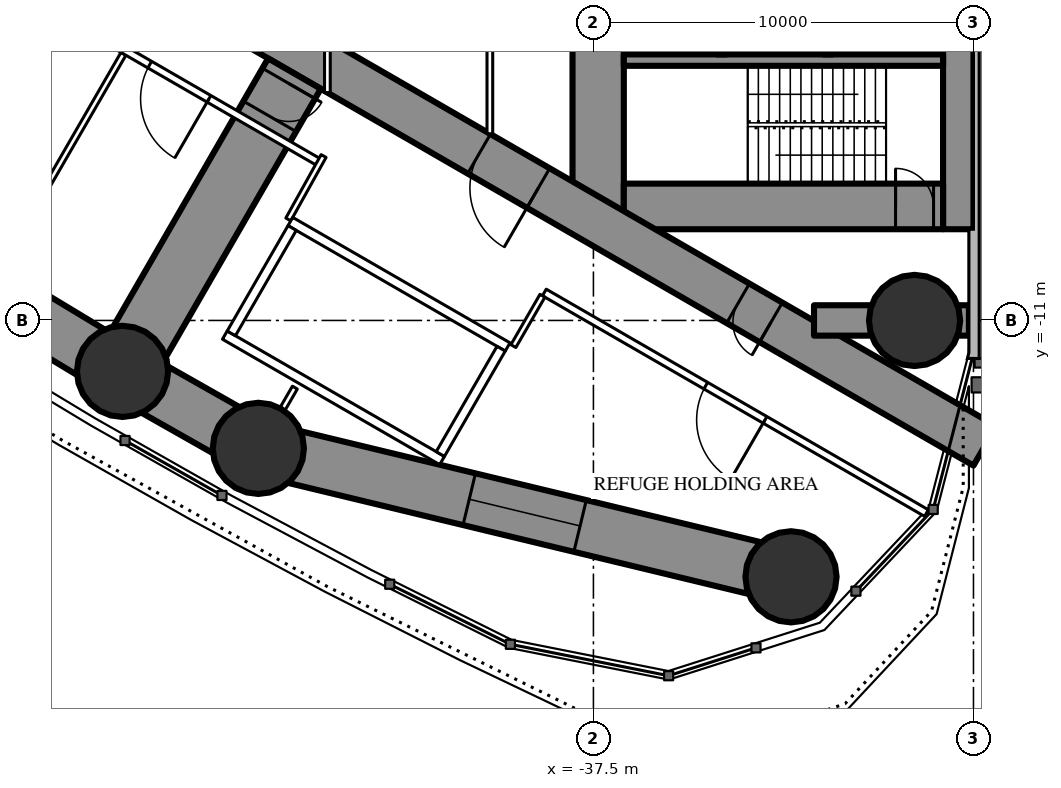
"""IFC4 building model, lengths in metres.
Left out: names, types, materials, properties, quantities, classifications, styles, units other than length and angle.
Written with IfcOpenShell. Run it as: python <this file> out.ifc"""

import sys

from ifc_helpers import new_model, si_unit, direction, frame, frame_2d, origin, origin_2d, place, context, subcontext, project, spatial, rectangle, circle, hollow_circle, extrude, element, fill, save


model = new_model("IFC4")
c1 = context("Model", 3, precision=1e-05, world=origin(), true_north=direction((0.0, 1.0)))
c2 = subcontext(c1, "Body", "Model", "MODEL_VIEW")
j1 = project(units=[si_unit("LENGTHUNIT", "METRE"), si_unit("PLANEANGLEUNIT", "RADIAN")], contexts=[c1])
p1 = place(None, origin())
s1 = spatial("IfcSite", under=j1, at=p1, CompositionType="ELEMENT")
p2 = place(p1, origin())
s2 = spatial("IfcBuilding", under=s1, at=p2, CompositionType="ELEMENT")
p3 = place(p2, frame((0.0, 0.0, 210.3)))
s3 = spatial("IfcBuildingStorey", under=s2, at=p3, CompositionType="ELEMENT", Elevation=210.3)
p4 = place(p3, frame((-32.301, -17.745, 0.0), z_axis=(0.0, 0.0, 1.0), x_axis=(1.0, 0.0, 0.0)))
e1 = element("IfcColumn", 1, at=p4, inside=s3, PredefinedType="COLUMN", context=c2, shape_type="SweptSolid", body=[
    extrude(circle(Radius=1.2, at=origin_2d()), origin(), (0.0, 0.0, 1.0), 5.0),
])
p5 = place(p3, frame((-29.05, -11.0, 0.0), z_axis=(0.0, 0.0, 1.0), x_axis=(1.0, 0.0, 0.0)))
e2 = element("IfcColumn", 2, at=p5, inside=s3, PredefinedType="COLUMN", context=c2, shape_type="SweptSolid", body=[
    extrude(hollow_circle(Radius=1.2, WallThickness=0.09, at=origin_2d()), origin(), (0.0, 0.0, 1.0), 5.0),
])
for number, where, z_axis, x_axis in (
    (3, (-49.89, -12.34, 0.0), (0.0, 0.0, 1.0), (1.0, 0.0, 0.0)),
    (4, (-46.317, -14.365, 0.0), (0.0, 0.0, 1.0), (1.0, 0.0, 0.0)),
):
    element("IfcColumn", number, at=place(p3, frame(where, z_axis=z_axis, x_axis=x_axis)), inside=s3, PredefinedType="COLUMN", context=c2, shape_type="SweptSolid", body=[
        extrude(circle(Radius=1.2, at=origin_2d()), origin(), (0.0, 0.0, 1.0), 5.0),
    ])
p6 = place(p3, frame((-27.9, 8.6, 0.0), z_axis=(0.0, 0.0, 1.0), x_axis=(0.0, -1.0, 0.0)))
e5 = element("IfcWall", 5, at=p6, inside=s3, PredefinedType="SHEAR", context=c2, shape_type="SweptSolid", body=[
    extrude(rectangle(XDim=17.2, YDim=0.8, at=frame_2d((8.6, 0.0))), origin(), (0.0, 0.0, 1.0), 5.0),
])
p7 = place(p6, frame((6.95, 0.0, 0.0)))
e6 = element("IfcOpeningElement", 6, at=p7, cuts=e5, PredefinedType="OPENING", context=c2, shape_type="SweptSolid", body=[
    extrude(rectangle(XDim=0.9, YDim=2.2, at=frame_2d((0.45, 1.1))), frame((0.0, 0.41, 0.0), z_axis=(0.0, -1.0, 0.0), x_axis=(1.0, 0.0, 0.0)), (0.0, 0.0, 1.0), 0.82),
])
p8 = place(p3, frame((-37.375, 8.6, 0.0), z_axis=(0.0, 0.0, 1.0), x_axis=(0.0, -1.0, 0.0)))
e7 = element("IfcWall", 7, at=p8, inside=s3, PredefinedType="SHEAR", context=c2, shape_type="SweptSolid", body=[
    extrude(rectangle(XDim=17.2, YDim=1.35, at=frame_2d((8.6, 0.0))), origin(), (0.0, 0.0, 1.0), 5.0),
])
p9 = place(p8, frame((7.7, 0.0, 0.0)))
e8 = element("IfcOpeningElement", 8, at=p9, cuts=e7, PredefinedType="OPENING", context=c2, shape_type="SweptSolid", body=[
    extrude(rectangle(XDim=1.8, YDim=2.2, at=frame_2d((0.9, 1.1))), frame((0.0, 0.685, 0.0), z_axis=(0.0, -1.0, 0.0), x_axis=(1.0, 0.0, 0.0)), (0.0, 0.0, 1.0), 1.37),
])
p10 = place(p3, frame((-28.3, -8.0, 0.0), z_axis=(0.0, 0.0, 1.0), x_axis=(-1.0, 0.0, 0.0)))
e9 = element("IfcWall", 9, at=p10, inside=s3, PredefinedType="SHEAR", context=c2, shape_type="SweptSolid", body=[
    extrude(rectangle(XDim=8.4, YDim=1.2, at=frame_2d((4.2, 0.0))), origin(), (0.0, 0.0, 1.0), 5.0),
])
p11 = place(p10, frame((0.25, 0.0, 0.0)))
e10 = element("IfcOpeningElement", 10, at=p11, cuts=e9, PredefinedType="OPENING", context=c2, shape_type="SweptSolid", body=[
    extrude(rectangle(XDim=1.0, YDim=2.2, at=frame_2d((0.5, 1.1))), frame((0.0, 0.61, 0.0), z_axis=(0.0, -1.0, 0.0), x_axis=(1.0, 0.0, 0.0)), (0.0, 0.0, 1.0), 1.22),
])
p12 = place(p3, frame((-28.3, -4.15, 0.0), z_axis=(0.0, 0.0, 1.0), x_axis=(-1.0, 0.0, 0.0)))
e11 = element("IfcWall", 11, at=p12, inside=s3, PredefinedType="SHEAR", context=c2, shape_type="SweptSolid", body=[
    extrude(rectangle(XDim=8.4, YDim=0.3, at=frame_2d((4.2, 0.0))), origin(), (0.0, 0.0, 1.0), 5.0),
])
p13 = place(p3, frame((-31.325, -1.9, 0.0), z_axis=(0.0, 0.0, 1.0), x_axis=(0.0, -1.0, 0.0)))
e12 = element("IfcWall", 12, at=p13, inside=s3, PredefinedType="SHEAR", context=c2, shape_type="SweptSolid", body=[
    extrude(rectangle(XDim=2.1, YDim=0.25, at=frame_2d((1.05, 0.0))), origin(), (0.0, 0.0, 1.0), 5.0),
])
p14 = place(p13, frame((0.5, 0.0, 0.0)))
e13 = element("IfcOpeningElement", 13, at=p14, cuts=e12, PredefinedType="OPENING", context=c2, shape_type="SweptSolid", body=[
    extrude(rectangle(XDim=1.1, YDim=2.2, at=frame_2d((0.55, 1.1))), frame((0.0, 0.135, 0.0), z_axis=(0.0, -1.0, 0.0), x_axis=(1.0, 0.0, 0.0)), (0.0, 0.0, 1.0), 0.27),
])
p15 = place(p3, frame((-34.125, -1.65, 0.0), z_axis=(0.0, 0.0, 1.0), x_axis=(0.0, -1.0, 0.0)))
e14 = element("IfcWall", 14, at=p15, inside=s3, PredefinedType="SHEAR", context=c2, shape_type="SweptSolid", body=[
    extrude(rectangle(XDim=2.35, YDim=0.25, at=frame_2d((1.175, 0.0))), origin(), (0.0, 0.0, 1.0), 5.0),
])
p16 = place(p3, frame((-27.2, -14.3, 0.0), z_axis=(0.0, 0.0, 1.0), x_axis=(-0.866024021859, 0.500002393557, 0.0)))
e15 = element("IfcWall", 15, at=p16, inside=s3, PredefinedType="SHEAR", context=c2, shape_type="SweptSolid", body=[
    extrude(rectangle(XDim=27.907, YDim=1.2, at=frame_2d((13.954, 0.0))), origin(), (0.0, 0.0, 1.0), 5.0),
])
p17 = place(p16, frame((6.5, 0.0, 0.0)))
e16 = element("IfcOpeningElement", 16, at=p17, cuts=e15, PredefinedType="OPENING", context=c2, shape_type="SweptSolid", body=[
    extrude(rectangle(XDim=1.0, YDim=2.2, at=frame_2d((0.5, 1.1))), frame((0.0, 0.61, 0.0), z_axis=(0.0, -1.0, 0.0), x_axis=(1.0, 0.0, 0.0)), (0.0, 0.0, 1.0), 1.22),
])
p18 = place(p16, frame((13.568, 0.0, 0.0)))
e17 = element("IfcOpeningElement", 17, at=p18, cuts=e15, PredefinedType="OPENING", context=c2, shape_type="SweptSolid", body=[
    extrude(rectangle(XDim=1.8, YDim=2.2, at=frame_2d((0.9, 1.1))), frame((0.0, 0.61, 0.0), z_axis=(0.0, -1.0, 0.0), x_axis=(1.0, 0.0, 0.0)), (0.0, 0.0, 1.0), 1.22),
])
p19 = place(p3, frame((-27.62, -11.0, 0.0), z_axis=(0.0, 0.0, 1.0), x_axis=(-1.0, 0.0, 0.0)))
e18 = element("IfcWall", 18, at=p19, inside=s3, PredefinedType="SHEAR", context=c2, shape_type="SweptSolid", body=[
    extrude(rectangle(XDim=4.076, YDim=0.8, at=frame_2d((2.038, 0.0))), origin(), (0.0, 0.0, 1.0), 5.0),
])
p20 = place(p3, frame((-45.366, -4.504, 0.0), z_axis=(0.0, 0.0, 1.0), x_axis=(-0.499998848701, -0.866026068486, 0.0)))
e19 = element("IfcWall", 19, at=p20, inside=s3, PredefinedType="SHEAR", context=c2, shape_type="SweptSolid", body=[
    extrude(rectangle(XDim=9.048, YDim=1.6, at=frame_2d((4.524, 0.0))), origin(), (0.0, 0.0, 1.0), 5.0),
])
p21 = place(p20, frame((0.3, 0.0, 0.0)))
e20 = element("IfcOpeningElement", 20, at=p21, cuts=e19, PredefinedType="OPENING", context=c2, shape_type="SweptSolid", body=[
    extrude(rectangle(XDim=1.0, YDim=2.2, at=frame_2d((0.5, 1.1))), frame((0.0, 0.81, 0.0), z_axis=(0.0, -1.0, 0.0), x_axis=(1.0, 0.0, 0.0)), (0.0, 0.0, 1.0), 1.62),
])
for number, where, z_axis, x_axis in (
    (21, (-53.408, -10.219, 0.0), (0.0, 0.0, 1.0), (0.856, -0.516, 0.0)),
    (22, (-49.89, -12.34, 0.0), (0.0, 0.0, 1.0), (0.87, -0.493, 0.0)),
):
    element("IfcWall", number, at=place(p3, frame(where, z_axis=z_axis, x_axis=x_axis)), inside=s3, PredefinedType="SHEAR", context=c2, shape_type="SweptSolid", body=[
        extrude(rectangle(XDim=4.108, YDim=1.4, at=frame_2d((2.054, 0.0))), origin(), (0.0, 0.0, 1.0), 5.0),
    ])
p22 = place(p3, frame((-46.317, -14.365, 0.0), z_axis=(0.0, 0.0, 1.0), x_axis=(0.972132796948, -0.234430853556, 0.0)))
e23 = element("IfcWall", 23, at=p22, inside=s3, PredefinedType="SHEAR", context=c2, shape_type="SweptSolid", body=[
    extrude(rectangle(XDim=14.417, YDim=1.4, at=frame_2d((7.209, 0.0))), origin(), (0.0, 0.0, 1.0), 5.0),
])
p23 = place(p22, frame((5.709, 0.0, 0.6)))
e24 = element("IfcOpeningElement", 24, at=p23, cuts=e23, PredefinedType="OPENING", context=c2, shape_type="SweptSolid", body=[
    extrude(rectangle(XDim=3.0, YDim=1.2, at=frame_2d((1.5, 0.6))), frame((0.0, 0.71, 0.0), z_axis=(0.0, -1.0, 0.0), x_axis=(1.0, 0.0, 0.0)), (0.0, 0.0, 1.0), 1.42),
])
p24 = place(p3, frame((-49.866, -3.985, 0.0), z_axis=(0.0, 0.0, 1.0), x_axis=(-0.500000694566, -0.866025002776, 0.0)))
e25 = element("IfcWall", 25, at=p24, inside=s3, PredefinedType="PARTITIONING", context=c2, shape_type="SweptSolid", body=[
    extrude(rectangle(XDim=5.95, YDim=0.15, at=frame_2d((2.975, 0.0))), origin(), (0.0, 0.0, 1.0), 3.85),
])
p25 = place(p3, frame((-45.356, -12.767, 0.0), z_axis=(0.0, 0.0, 1.0), x_axis=(-0.499886366516, -0.866091000168, 0.0)))
e26 = element("IfcWall", 26, at=p25, inside=s3, PredefinedType="PARTITIONING", context=c2, shape_type="SweptSolid", body=[
    extrude(rectangle(XDim=0.645, YDim=0.15, at=frame_2d((0.322, 0.0))), origin(), (0.0, 0.0, 1.0), 4.75),
])
p26 = place(p3, frame((-28.737, -16.068, 0.0), z_axis=(0.0, 0.0, 1.0), x_axis=(-0.866029399323, 0.49999307946, 0.0)))
e27 = element("IfcWall", 27, at=p26, inside=s3, PredefinedType="PARTITIONING", context=c2, shape_type="SweptSolid", body=[
    extrude(rectangle(XDim=11.61, YDim=0.2, at=frame_2d((5.805, 0.0))), origin(), (0.0, 0.0, 1.0), 4.75),
])
p27 = place(p26, frame((4.905, 0.0, 0.0)))
e28 = element("IfcOpeningElement", 28, at=p27, cuts=e27, PredefinedType="OPENING", context=c2, shape_type="SweptSolid", body=[
    extrude(rectangle(XDim=1.8, YDim=2.2, at=frame_2d((0.9, 1.1))), frame((0.0, 0.11, 0.0), z_axis=(0.0, -1.0, 0.0), x_axis=(1.0, 0.0, 0.0)), (0.0, 0.0, 1.0), 0.22),
])
p28 = place(p3, frame((-44.715, -6.844, 0.0), z_axis=(0.0, 0.0, 1.0), x_axis=(-0.866025261224, 0.500000246922, 0.0)))
e29 = element("IfcWall", 29, at=p28, inside=s3, PredefinedType="PARTITIONING", context=c2, shape_type="SweptSolid", body=[
    extrude(rectangle(XDim=13.567, YDim=0.2, at=frame_2d((6.783, 0.0))), origin(), (0.0, 0.0, 1.0), 4.75),
])
p29 = place(p28, frame((7.925, 0.0, 0.0)))
e30 = element("IfcOpeningElement", 30, at=p29, cuts=e29, PredefinedType="OPENING", context=c2, shape_type="SweptSolid", body=[
    extrude(rectangle(XDim=2.0, YDim=2.4, at=frame_2d((1.0, 1.2))), frame((0.0, 0.11, 0.0), z_axis=(0.0, -1.0, 0.0), x_axis=(1.0, 0.0, 0.0)), (0.0, 0.0, 1.0), 0.22),
])
p30 = place(p28, frame((3.349, 0.0, 0.0)))
e31 = element("IfcOpeningElement", 31, at=p30, cuts=e29, PredefinedType="OPENING", context=c2, shape_type="SweptSolid", body=[
    extrude(rectangle(XDim=1.8, YDim=2.2, at=frame_2d((0.9, 1.1))), frame((0.0, 0.11, 0.0), z_axis=(0.0, -1.0, 0.0), x_axis=(1.0, 0.0, 0.0)), (0.0, 0.0, 1.0), 0.22),
])
p31 = place(p3, frame((-44.6, -6.673, 0.0), z_axis=(0.0, 0.0, 1.0), x_axis=(-0.486293872994, -0.873795324483, 0.0)))
e32 = element("IfcWall", 32, at=p31, inside=s3, PredefinedType="PARTITIONING", context=c2, shape_type="SweptSolid", body=[
    extrude(rectangle(XDim=1.91, YDim=0.15, at=frame_2d((0.955, 0.0))), origin(), (0.0, 0.0, 1.0), 4.75),
])
p32 = place(p3, frame((-38.841, -10.35, 0.0), z_axis=(0.0, 0.0, 1.0), x_axis=(-0.499966498333, -0.866044745117, 0.0)))
e33 = element("IfcWall", 33, at=p32, inside=s3, PredefinedType="PARTITIONING", context=c2, shape_type="SweptSolid", body=[
    extrude(rectangle(XDim=1.53, YDim=0.15, at=frame_2d((0.765, 0.0))), origin(), (0.0, 0.0, 1.0), 4.75),
])
p33 = place(p3, frame((-40.225, 6.087, 0.0), z_axis=(0.0, 0.0, 1.0), x_axis=(0.0, -1.0, 0.0)))
e34 = element("IfcWall", 34, at=p33, inside=s3, PredefinedType="PARTITIONING", context=c2, shape_type="SweptSolid", body=[
    extrude(rectangle(XDim=12.174, YDim=0.15, at=frame_2d((6.087, 0.0))), origin(), (0.0, 0.0, 1.0), 4.75),
])
p34 = place(p33, frame((5.187, 0.0, 0.0)))
e35 = element("IfcOpeningElement", 35, at=p34, cuts=e34, PredefinedType="OPENING", context=c2, shape_type="SweptSolid", body=[
    extrude(rectangle(XDim=1.8, YDim=2.2, at=frame_2d((0.9, 1.1))), frame((0.0, 0.085, 0.0), z_axis=(0.0, -1.0, 0.0), x_axis=(1.0, 0.0, 0.0)), (0.0, 0.0, 1.0), 0.17),
])
p35 = place(p3, frame((-44.5, 5.005, 0.0), z_axis=(0.0, 0.0, 1.0), x_axis=(0.0, -1.0, 0.0)))
e36 = element("IfcWall", 36, at=p35, inside=s3, PredefinedType="PARTITIONING", context=c2, shape_type="SweptSolid", body=[
    extrude(rectangle(XDim=10.009, YDim=0.15, at=frame_2d((5.005, 0.0))), origin(), (0.0, 0.0, 1.0), 4.75),
])
p36 = place(p35, frame((4.505, 0.0, 0.0)))
e37 = element("IfcOpeningElement", 37, at=p36, cuts=e36, PredefinedType="OPENING", context=c2, shape_type="SweptSolid", body=[
    extrude(rectangle(XDim=1.0, YDim=2.2, at=frame_2d((0.5, 1.1))), frame((0.0, 0.085, 0.0), z_axis=(0.0, -1.0, 0.0), x_axis=(1.0, 0.0, 0.0)), (0.0, 0.0, 1.0), 0.17),
])
p37 = place(p3, frame((-39.758, -11.697, 0.0), z_axis=(0.0, 0.0, 1.0), x_axis=(-0.866024194504, 0.500002094529, 0.0)))
e38 = element("IfcWall", 38, at=p37, inside=s3, PredefinedType="PARTITIONING", context=c2, shape_type="SweptSolid", body=[
    extrude(rectangle(XDim=6.6, YDim=0.25, at=frame_2d((3.3, 0.0))), origin(), (0.0, 0.0, 1.0), 4.75),
])
p38 = place(p3, frame((-41.482, -14.686, 0.0), z_axis=(0.0, 0.0, 1.0), x_axis=(-0.86603344179, 0.499986077507, 0.0)))
e39 = element("IfcWall", 39, at=p38, inside=s3, PredefinedType="PARTITIONING", context=c2, shape_type="SweptSolid", body=[
    extrude(rectangle(XDim=6.6, YDim=0.25, at=frame_2d((3.3, 0.0))), origin(), (0.0, 0.0, 1.0), 4.75),
])
for number, where, z_axis, x_axis in (
    (40, (-39.928, -11.743, 0.0), (0.0, 0.0, 1.0), (-0.5, -0.866, 0.0)),
    (41, (-45.428, -8.568, 0.0), (0.0, 0.0, 1.0), (-0.5, -0.866, 0.0)),
):
    element("IfcWall", number, at=place(p3, frame(where, z_axis=z_axis, x_axis=x_axis)), inside=s3, PredefinedType="PARTITIONING", context=c2, shape_type="SweptSolid", body=[
        extrude(rectangle(XDim=3.201, YDim=0.25, at=frame_2d((1.6, 0.0))), origin(), (0.0, 0.0, 1.0), 4.75),
    ])
p39 = place(p23, origin())
e42 = element("IfcWindow", 42, at=p39, inside=s3, PartitioningType="SINGLE_PANEL", PredefinedType="WINDOW", context=c2, shape_type="SweptSolid", body=[
    extrude(rectangle(XDim=3.0, YDim=1.2, at=frame_2d((1.5, 0.6))), frame((0.0, 0.03, 0.0), z_axis=(0.0, -1.0, 0.0), x_axis=(1.0, 0.0, 0.0)), (0.0, 0.0, 1.0), 0.06),
])
fill(e24, e42)
p40 = place(p21, origin())
e43 = element("IfcDoor", 43, at=p40, inside=s3, OperationType="SINGLE_SWING_LEFT", PredefinedType="DOOR", context=c2, shape_type="SweptSolid", body=[
    extrude(rectangle(XDim=1.0, YDim=2.2, at=frame_2d((0.5, 1.1))), frame((0.0, 0.025, 0.0), z_axis=(0.0, -1.0, 0.0), x_axis=(1.0, 0.0, 0.0)), (0.0, 0.0, 1.0), 0.05),
])
fill(e20, e43)
p41 = place(p30, origin())
e44 = element("IfcDoor", 44, at=p41, inside=s3, OperationType="DOUBLE_DOOR_SINGLE_SWING", PredefinedType="DOOR", context=c2, shape_type="SweptSolid", body=[
    extrude(rectangle(XDim=1.8, YDim=2.2, at=frame_2d((0.9, 1.1))), frame((0.0, 0.025, 0.0), z_axis=(0.0, -1.0, 0.0), x_axis=(1.0, 0.0, 0.0)), (0.0, 0.0, 1.0), 0.05),
])
fill(e31, e44)
p42 = place(p27, origin())
e45 = element("IfcDoor", 45, at=p42, inside=s3, OperationType="DOUBLE_DOOR_SINGLE_SWING", PredefinedType="DOOR", context=c2, shape_type="SweptSolid", body=[
    extrude(rectangle(XDim=1.8, YDim=2.2, at=frame_2d((0.9, 1.1))), frame((0.0, 0.025, 0.0), z_axis=(0.0, -1.0, 0.0), x_axis=(1.0, 0.0, 0.0)), (0.0, 0.0, 1.0), 0.05),
])
fill(e28, e45)
p43 = place(p17, origin())
e46 = element("IfcDoor", 46, at=p43, inside=s3, OperationType="SINGLE_SWING_LEFT", PredefinedType="DOOR", context=c2, shape_type="SweptSolid", body=[
    extrude(rectangle(XDim=1.0, YDim=2.2, at=frame_2d((0.5, 1.1))), frame((0.0, 0.025, 0.0), z_axis=(0.0, -1.0, 0.0), x_axis=(1.0, 0.0, 0.0)), (0.0, 0.0, 1.0), 0.05),
])
fill(e16, e46)
p44 = place(p18, origin())
e47 = element("IfcDoor", 47, at=p44, inside=s3, OperationType="DOUBLE_DOOR_SINGLE_SWING", PredefinedType="DOOR", context=c2, shape_type="SweptSolid", body=[
    extrude(rectangle(XDim=1.8, YDim=2.2, at=frame_2d((0.9, 1.1))), frame((0.0, 0.025, 0.0), z_axis=(0.0, -1.0, 0.0), x_axis=(1.0, 0.0, 0.0)), (0.0, 0.0, 1.0), 0.05),
])
fill(e17, e47)
p45 = place(p11, origin())
e48 = element("IfcDoor", 48, at=p45, inside=s3, OperationType="SINGLE_SWING_RIGHT", PredefinedType="DOOR", context=c2, shape_type="SweptSolid", body=[
    extrude(rectangle(XDim=1.0, YDim=2.2, at=frame_2d((0.5, 1.1))), frame((0.0, 0.025, 0.0), z_axis=(0.0, -1.0, 0.0), x_axis=(1.0, 0.0, 0.0)), (0.0, 0.0, 1.0), 0.05),
])
fill(e10, e48)
save(model, sys.argv[1])
